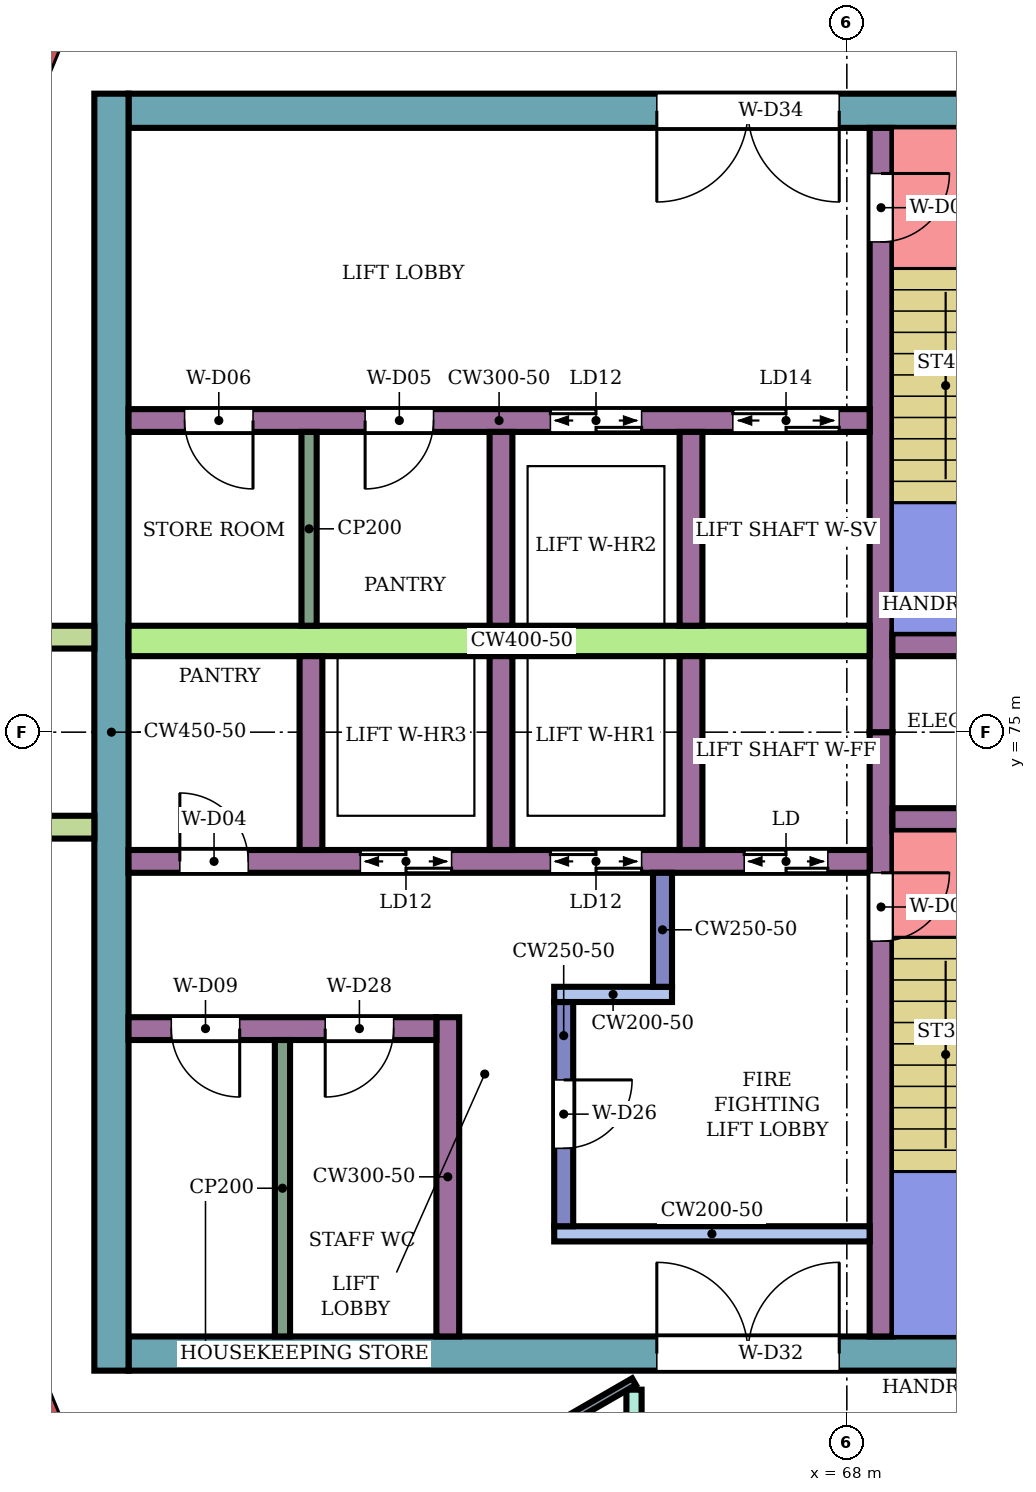
"""IFC4 building model, lengths in metres.
Left out: names, types, materials, properties, quantities, classifications, styles, units other than length and angle.
Written with IfcOpenShell. Run it as: python <this file> out.ifc"""

import sys

from ifc_helpers import new_model, si_unit, direction, frame, frame_2d, origin, place, context, subcontext, project, spatial, rectangle, extrude, element, fill, save


model = new_model("IFC4")
c1 = context("Model", 3, precision=1e-05, world=origin(), true_north=direction((0.0, 1.0)))
c2 = subcontext(c1, "Body", "Model", "MODEL_VIEW")
j1 = project(units=[si_unit("LENGTHUNIT", "METRE"), si_unit("PLANEANGLEUNIT", "RADIAN")], contexts=[c1])
p1 = place(None, origin())
s1 = spatial("IfcSite", under=j1, at=p1, CompositionType="ELEMENT")
p2 = place(p1, origin())
s2 = spatial("IfcBuilding", under=s1, at=p2, CompositionType="ELEMENT")
p3 = place(p2, frame((0.0, 0.0, 284.1)))
s3 = spatial("IfcBuildingStorey", under=s2, at=p3, CompositionType="ELEMENT", Elevation=284.1)
p4 = place(p3, frame((72.1, 66.825, 0.0), z_axis=(0.0, 0.0, 1.0), x_axis=(-1.0, 0.0, 0.0)))
e1 = element("IfcWall", 1, at=p4, inside=s3, PredefinedType="SHEAR", context=c2, shape_type="SweptSolid", body=[
    extrude(rectangle(XDim=13.55, YDim=0.45, at=frame_2d((6.775, 0.0))), origin(), (0.0, 0.0, 1.0), 3.88),
])
p5 = place(p4, frame((4.2, 0.0, 0.0)))
e2 = element("IfcOpeningElement", 2, at=p5, cuts=e1, PredefinedType="OPENING", context=c2, shape_type="SweptSolid", body=[
    extrude(rectangle(XDim=2.4, YDim=2.4, at=frame_2d((1.2, 1.2))), frame((0.0, 0.235, 0.0), z_axis=(0.0, -1.0, 0.0), x_axis=(1.0, 0.0, 0.0)), (0.0, 0.0, 1.0), 0.47),
])
p6 = place(p3, frame((72.1, 83.175, 0.0), z_axis=(0.0, 0.0, 1.0), x_axis=(-1.0, 0.0, 0.0)))
e3 = element("IfcWall", 3, at=p6, inside=s3, PredefinedType="SHEAR", context=c2, shape_type="SweptSolid", body=[
    extrude(rectangle(XDim=13.55, YDim=0.45, at=frame_2d((6.775, 0.0))), origin(), (0.0, 0.0, 1.0), 3.88),
])
p7 = place(p6, frame((4.2, 0.0, 0.0)))
e4 = element("IfcOpeningElement", 4, at=p7, cuts=e3, PredefinedType="OPENING", context=c2, shape_type="SweptSolid", body=[
    extrude(rectangle(XDim=2.4, YDim=2.4, at=frame_2d((1.2, 1.2))), frame((0.0, 0.235, 0.0), z_axis=(0.0, -1.0, 0.0), x_axis=(1.0, 0.0, 0.0)), (0.0, 0.0, 1.0), 0.47),
])
p8 = place(p3, frame((58.325, 83.4, 0.0), z_axis=(0.0, 0.0, 1.0), x_axis=(0.0, -1.0, 0.0)))
e5 = element("IfcWall", 5, at=p8, inside=s3, PredefinedType="SHEAR", context=c2, shape_type="SweptSolid", body=[
    extrude(rectangle(XDim=16.8, YDim=0.45, at=frame_2d((8.4, 0.0))), origin(), (0.0, 0.0, 1.0), 3.88),
])
p9 = place(p3, frame((68.45, 75.0, 0.0), z_axis=(0.0, 0.0, 1.0), x_axis=(0.0, -1.0, 0.0)))
e6 = element("IfcWall", 6, at=p9, inside=s3, PredefinedType="SHEAR", context=c2, shape_type="SweptSolid", body=[
    extrude(rectangle(XDim=7.95, YDim=0.3, at=frame_2d((3.975, 0.0))), origin(), (0.0, 0.0, 1.0), 3.88),
])
p10 = place(p9, frame((1.85, 0.0, 0.0)))
e7 = element("IfcOpeningElement", 7, at=p10, cuts=e6, PredefinedType="OPENING", context=c2, shape_type="SweptSolid", body=[
    extrude(rectangle(XDim=0.9, YDim=2.1, at=frame_2d((0.45, 1.05))), frame((0.0, 0.16, 0.0), z_axis=(0.0, -1.0, 0.0), x_axis=(1.0, 0.0, 0.0)), (0.0, 0.0, 1.0), 0.32),
])
p11 = place(p3, frame((68.45, 82.95, 0.0), z_axis=(0.0, 0.0, 1.0), x_axis=(0.0, -1.0, 0.0)))
e8 = element("IfcWall", 8, at=p11, inside=s3, PredefinedType="SHEAR", context=c2, shape_type="SweptSolid", body=[
    extrude(rectangle(XDim=7.95, YDim=0.3, at=frame_2d((3.975, 0.0))), origin(), (0.0, 0.0, 1.0), 3.88),
])
p12 = place(p11, frame((0.6, 0.0, 0.0)))
e9 = element("IfcOpeningElement", 9, at=p12, cuts=e8, PredefinedType="OPENING", context=c2, shape_type="SweptSolid", body=[
    extrude(rectangle(XDim=0.9, YDim=2.1, at=frame_2d((0.45, 1.05))), frame((0.0, 0.16, 0.0), z_axis=(0.0, -1.0, 0.0), x_axis=(1.0, 0.0, 0.0)), (0.0, 0.0, 1.0), 0.32),
])
p13 = place(p3, frame((71.65, 73.85, 0.0), z_axis=(0.0, 0.0, 1.0), x_axis=(-1.0, 0.0, 0.0)))
e10 = element("IfcWall", 10, at=p13, inside=s3, PredefinedType="SHEAR", context=c2, shape_type="SweptSolid", body=[
    extrude(rectangle(XDim=3.05, YDim=0.3, at=frame_2d((1.525, 0.0))), origin(), (0.0, 0.0, 1.0), 3.88),
])
p14 = place(p13, frame((1.1, 0.0, 0.0)))
e11 = element("IfcOpeningElement", 11, at=p14, cuts=e10, PredefinedType="OPENING", context=c2, shape_type="SweptSolid", body=[
    extrude(rectangle(XDim=0.7, YDim=2.0, at=frame_2d((0.35, 1.0))), frame((0.0, 0.16, 0.0), z_axis=(0.0, -1.0, 0.0), x_axis=(1.0, 0.0, 0.0)), (0.0, 0.0, 1.0), 0.32),
])
p15 = place(p3, frame((71.65, 76.15, 0.0), z_axis=(0.0, 0.0, 1.0), x_axis=(-1.0, 0.0, 0.0)))
e12 = element("IfcWall", 12, at=p15, inside=s3, PredefinedType="SHEAR", context=c2, shape_type="SweptSolid", body=[
    extrude(rectangle(XDim=3.05, YDim=0.3, at=frame_2d((1.525, 0.0))), origin(), (0.0, 0.0, 1.0), 3.88),
])
p16 = place(p3, frame((68.3, 73.3, 0.0), z_axis=(0.0, 0.0, 1.0), x_axis=(-1.0, 0.0, 0.0)))
e13 = element("IfcWall", 13, at=p16, inside=s3, PredefinedType="SHEAR", context=c2, shape_type="SweptSolid", body=[
    extrude(rectangle(XDim=9.75, YDim=0.3, at=frame_2d((4.875, 0.0))), origin(), (0.0, 0.0, 1.0), 3.88),
])
p17 = place(p16, frame((0.55, 0.0, 0.0)))
e14 = element("IfcOpeningElement", 14, at=p17, cuts=e13, PredefinedType="OPENING", context=c2, shape_type="SweptSolid", body=[
    extrude(rectangle(XDim=1.1, YDim=2.1, at=frame_2d((0.55, 1.05))), frame((0.0, 0.16, 0.0), z_axis=(0.0, -1.0, 0.0), x_axis=(1.0, 0.0, 0.0)), (0.0, 0.0, 1.0), 0.32),
])
p18 = place(p16, frame((3.0, 0.0, 0.0)))
e15 = element("IfcOpeningElement", 15, at=p18, cuts=e13, PredefinedType="OPENING", context=c2, shape_type="SweptSolid", body=[
    extrude(rectangle(XDim=1.2, YDim=2.1, at=frame_2d((0.6, 1.05))), frame((0.0, 0.16, 0.0), z_axis=(0.0, -1.0, 0.0), x_axis=(1.0, 0.0, 0.0)), (0.0, 0.0, 1.0), 0.32),
])
p19 = place(p16, frame((5.5, 0.0, 0.0)))
e16 = element("IfcOpeningElement", 16, at=p19, cuts=e13, PredefinedType="OPENING", context=c2, shape_type="SweptSolid", body=[
    extrude(rectangle(XDim=1.2, YDim=2.1, at=frame_2d((0.6, 1.05))), frame((0.0, 0.16, 0.0), z_axis=(0.0, -1.0, 0.0), x_axis=(1.0, 0.0, 0.0)), (0.0, 0.0, 1.0), 0.32),
])
p20 = place(p16, frame((8.175, 0.0, 0.0)))
e17 = element("IfcOpeningElement", 17, at=p20, cuts=e13, PredefinedType="OPENING", context=c2, shape_type="SweptSolid", body=[
    extrude(rectangle(XDim=0.9, YDim=2.1, at=frame_2d((0.45, 1.05))), frame((0.0, 0.16, 0.0), z_axis=(0.0, -1.0, 0.0), x_axis=(1.0, 0.0, 0.0)), (0.0, 0.0, 1.0), 0.32),
])
p21 = place(p3, frame((68.3, 76.2, 0.0), z_axis=(0.0, 0.0, 1.0), x_axis=(-1.0, 0.0, 0.0)))
e18 = element("IfcWall", 18, at=p21, inside=s3, PredefinedType="SHEAR", context=c2, shape_type="SweptSolid", body=[
    extrude(rectangle(XDim=9.75, YDim=0.4, at=frame_2d((4.875, 0.0))), origin(), (0.0, 0.0, 1.0), 3.88),
])
p22 = place(p3, frame((68.3, 79.1, 0.0), z_axis=(0.0, 0.0, 1.0), x_axis=(-1.0, 0.0, 0.0)))
e19 = element("IfcWall", 19, at=p22, inside=s3, PredefinedType="SHEAR", context=c2, shape_type="SweptSolid", body=[
    extrude(rectangle(XDim=9.75, YDim=0.3, at=frame_2d((4.875, 0.0))), origin(), (0.0, 0.0, 1.0), 3.88),
])
p23 = place(p22, frame((0.4, 0.0, 0.0)))
e20 = element("IfcOpeningElement", 20, at=p23, cuts=e19, PredefinedType="OPENING", context=c2, shape_type="SweptSolid", body=[
    extrude(rectangle(XDim=1.4, YDim=2.1, at=frame_2d((0.7, 1.05))), frame((0.0, 0.16, 0.0), z_axis=(0.0, -1.0, 0.0), x_axis=(1.0, 0.0, 0.0)), (0.0, 0.0, 1.0), 0.32),
])
p24 = place(p22, frame((3.0, 0.0, 0.0)))
e21 = element("IfcOpeningElement", 21, at=p24, cuts=e19, PredefinedType="OPENING", context=c2, shape_type="SweptSolid", body=[
    extrude(rectangle(XDim=1.2, YDim=2.1, at=frame_2d((0.6, 1.05))), frame((0.0, 0.16, 0.0), z_axis=(0.0, -1.0, 0.0), x_axis=(1.0, 0.0, 0.0)), (0.0, 0.0, 1.0), 0.32),
])
p25 = place(p22, frame((5.738, 0.0, 0.0)))
e22 = element("IfcOpeningElement", 22, at=p25, cuts=e19, PredefinedType="OPENING", context=c2, shape_type="SweptSolid", body=[
    extrude(rectangle(XDim=0.9, YDim=2.1, at=frame_2d((0.45, 1.05))), frame((0.0, 0.16, 0.0), z_axis=(0.0, -1.0, 0.0), x_axis=(1.0, 0.0, 0.0)), (0.0, 0.0, 1.0), 0.32),
])
p26 = place(p22, frame((8.113, 0.0, 0.0)))
e23 = element("IfcOpeningElement", 23, at=p26, cuts=e19, PredefinedType="OPENING", context=c2, shape_type="SweptSolid", body=[
    extrude(rectangle(XDim=0.9, YDim=2.1, at=frame_2d((0.45, 1.05))), frame((0.0, 0.16, 0.0), z_axis=(0.0, -1.0, 0.0), x_axis=(1.0, 0.0, 0.0)), (0.0, 0.0, 1.0), 0.32),
])
for number, where, z_axis, x_axis in (
    (24, (65.95, 76.0, 0.0), (0.0, 0.0, 1.0), (0.0, -1.0, 0.0)),
    (25, (63.45, 76.0, 0.0), (0.0, 0.0, 1.0), (0.0, -1.0, 0.0)),
    (26, (60.95, 76.0, 0.0), (0.0, 0.0, 1.0), (0.0, -1.0, 0.0)),
    (27, (65.95, 78.95, 0.0), (0.0, 0.0, 1.0), (0.0, -1.0, 0.0)),
    (28, (63.45, 78.95, 0.0), (0.0, 0.0, 1.0), (0.0, -1.0, 0.0)),
):
    element("IfcWall", number, at=place(p3, frame(where, z_axis=z_axis, x_axis=x_axis)), inside=s3, PredefinedType="SHEAR", context=c2, shape_type="SweptSolid", body=[
        extrude(rectangle(XDim=2.55, YDim=0.3, at=frame_2d((1.275, 0.0))), origin(), (0.0, 0.0, 1.0), 3.88),
    ])
p27 = place(p3, frame((68.3, 68.4, 0.0), z_axis=(0.0, 0.0, 1.0), x_axis=(-1.0, 0.0, 0.0)))
e29 = element("IfcWall", 29, at=p27, inside=s3, PredefinedType="SHEAR", context=c2, shape_type="SweptSolid", body=[
    extrude(rectangle(XDim=4.15, YDim=0.2, at=frame_2d((2.075, 0.0))), origin(), (0.0, 0.0, 1.0), 3.88),
])
p28 = place(p3, frame((64.275, 71.45, 0.0), z_axis=(0.0, 0.0, 1.0), x_axis=(0.0, -1.0, 0.0)))
e30 = element("IfcWall", 30, at=p28, inside=s3, PredefinedType="SHEAR", context=c2, shape_type="SweptSolid", body=[
    extrude(rectangle(XDim=2.95, YDim=0.25, at=frame_2d((1.475, 0.0))), origin(), (0.0, 0.0, 1.0), 3.88),
])
p29 = place(p28, frame((1.025, 0.0, 0.0)))
e31 = element("IfcOpeningElement", 31, at=p29, cuts=e30, PredefinedType="OPENING", context=c2, shape_type="SweptSolid", body=[
    extrude(rectangle(XDim=0.9, YDim=2.1, at=frame_2d((0.45, 1.05))), frame((0.0, 0.135, 0.0), z_axis=(0.0, -1.0, 0.0), x_axis=(1.0, 0.0, 0.0)), (0.0, 0.0, 1.0), 0.27),
])
p30 = place(p3, frame((65.7, 71.55, 0.0), z_axis=(0.0, 0.0, 1.0), x_axis=(-1.0, 0.0, 0.0)))
e32 = element("IfcWall", 32, at=p30, inside=s3, PredefinedType="SHEAR", context=c2, shape_type="SweptSolid", body=[
    extrude(rectangle(XDim=1.55, YDim=0.2, at=frame_2d((0.775, 0.0))), origin(), (0.0, 0.0, 1.0), 3.88),
])
p31 = place(p3, frame((65.575, 73.15, 0.0), z_axis=(0.0, 0.0, 1.0), x_axis=(0.0, -1.0, 0.0)))
e33 = element("IfcWall", 33, at=p31, inside=s3, PredefinedType="SHEAR", context=c2, shape_type="SweptSolid", body=[
    extrude(rectangle(XDim=1.5, YDim=0.25, at=frame_2d((0.75, 0.0))), origin(), (0.0, 0.0, 1.0), 3.88),
])
p32 = place(p3, frame((62.75, 71.25, 0.0), z_axis=(0.0, 0.0, 1.0), x_axis=(0.0, -1.0, 0.0)))
e34 = element("IfcWall", 34, at=p32, inside=s3, PredefinedType="SHEAR", context=c2, shape_type="SweptSolid", body=[
    extrude(rectangle(XDim=4.2, YDim=0.3, at=frame_2d((2.1, 0.0))), origin(), (0.0, 0.0, 1.0), 3.88),
])
p33 = place(p3, frame((62.6, 71.1, 0.0), z_axis=(0.0, 0.0, 1.0), x_axis=(-1.0, 0.0, 0.0)))
e35 = element("IfcWall", 35, at=p33, inside=s3, PredefinedType="SHEAR", context=c2, shape_type="SweptSolid", body=[
    extrude(rectangle(XDim=4.05, YDim=0.3, at=frame_2d((2.025, 0.0))), origin(), (0.0, 0.0, 1.0), 3.88),
])
p34 = place(p33, frame((0.562, 0.0, 0.0)))
e36 = element("IfcOpeningElement", 36, at=p34, cuts=e35, PredefinedType="OPENING", context=c2, shape_type="SweptSolid", body=[
    extrude(rectangle(XDim=0.9, YDim=2.1, at=frame_2d((0.45, 1.05))), frame((0.0, 0.16, 0.0), z_axis=(0.0, -1.0, 0.0), x_axis=(1.0, 0.0, 0.0)), (0.0, 0.0, 1.0), 0.32),
])
p35 = place(p33, frame((2.587, 0.0, 0.0)))
e37 = element("IfcOpeningElement", 37, at=p35, cuts=e35, PredefinedType="OPENING", context=c2, shape_type="SweptSolid", body=[
    extrude(rectangle(XDim=0.9, YDim=2.1, at=frame_2d((0.45, 1.05))), frame((0.0, 0.16, 0.0), z_axis=(0.0, -1.0, 0.0), x_axis=(1.0, 0.0, 0.0)), (0.0, 0.0, 1.0), 0.32),
])
for number, where, z_axis, x_axis in (
    (38, (58.1, 76.25, 0.0), (0.0, 0.0, 1.0), (-1.0, 0.0, 0.0)),
    (39, (58.1, 73.75, 0.0), (0.0, 0.0, 1.0), (-1.0, 0.0, 0.0)),
):
    element("IfcWall", number, at=place(p3, frame(where, z_axis=z_axis, x_axis=x_axis)), inside=s3, PredefinedType="NOTDEFINED", context=c2, shape_type="SweptSolid", body=[
        extrude(rectangle(XDim=2.416, YDim=0.3, at=frame_2d((1.208, 0.0))), origin(), (0.0, 0.0, 1.0), 4.2),
    ])
p36 = place(p3, frame((65.2, 65.2, 0.0), z_axis=(0.0, 0.0, 1.0), x_axis=(0.0, 1.0, 0.0)))
e40 = element("IfcWall", 40, at=p36, inside=s3, PredefinedType="PARTITIONING", context=c2, shape_type="SweptSolid", body=[
    extrude(rectangle(XDim=1.15, YDim=0.2, at=frame_2d((0.575, 0.0))), origin(), (0.0, 0.0, 1.0), 3.75),
])
p37 = place(p3, frame((58.958, 62.851, 0.0), z_axis=(0.0, 0.0, 1.0), x_axis=(0.866044015472, 0.499967762227, 0.0)))
e41 = element("IfcWall", 41, at=p37, inside=s3, PredefinedType="PARTITIONING", context=c2, shape_type="SweptSolid", body=[
    extrude(rectangle(XDim=7.208, YDim=0.1, at=frame_2d((3.604, 0.0))), origin(), (0.0, 0.0, 1.0), 3.75),
])
p38 = place(p37, frame((3.179, 0.0, 0.0)))
e42 = element("IfcOpeningElement", 42, at=p38, cuts=e41, PredefinedType="OPENING", context=c2, shape_type="SweptSolid", body=[
    extrude(rectangle(XDim=0.9, YDim=2.1, at=frame_2d((0.45, 1.05))), frame((0.0, 0.06, 0.0), z_axis=(0.0, -1.0, 0.0), x_axis=(1.0, 0.0, 0.0)), (0.0, 0.0, 1.0), 0.12),
])
p39 = place(p3, frame((60.925, 78.95, 0.0), z_axis=(0.0, 0.0, 1.0), x_axis=(0.0, -1.0, 0.0)))
e43 = element("IfcWall", 43, at=p39, inside=s3, PredefinedType="PARTITIONING", context=c2, shape_type="SweptSolid", body=[
    extrude(rectangle(XDim=2.55, YDim=0.2, at=frame_2d((1.275, 0.0))), origin(), (0.0, 0.0, 1.0), 3.88),
])
p40 = place(p3, frame((60.575, 70.95, 0.0), z_axis=(0.0, 0.0, 1.0), x_axis=(0.0, -1.0, 0.0)))
e44 = element("IfcWall", 44, at=p40, inside=s3, PredefinedType="PARTITIONING", context=c2, shape_type="SweptSolid", body=[
    extrude(rectangle(XDim=3.9, YDim=0.2, at=frame_2d((1.95, 0.0))), origin(), (0.0, 0.0, 1.0), 3.88),
])
p41 = place(p10, origin())
e45 = element("IfcDoor", 45, at=p41, inside=s3, OperationType="SINGLE_SWING_LEFT", PredefinedType="DOOR", context=c2, shape_type="SweptSolid", body=[
    extrude(rectangle(XDim=0.9, YDim=2.1, at=frame_2d((0.45, 1.05))), frame((0.0, 0.025, 0.0), z_axis=(0.0, -1.0, 0.0), x_axis=(1.0, 0.0, 0.0)), (0.0, 0.0, 1.0), 0.05),
])
fill(e7, e45)
p42 = place(p12, origin())
e46 = element("IfcDoor", 46, at=p42, inside=s3, OperationType="SINGLE_SWING_LEFT", PredefinedType="DOOR", context=c2, shape_type="SweptSolid", body=[
    extrude(rectangle(XDim=0.9, YDim=2.1, at=frame_2d((0.45, 1.05))), frame((0.0, 0.025, 0.0), z_axis=(0.0, -1.0, 0.0), x_axis=(1.0, 0.0, 0.0)), (0.0, 0.0, 1.0), 0.05),
])
fill(e9, e46)
p43 = place(p17, origin())
e47 = element("IfcDoor", 47, at=p43, inside=s3, OperationType="DOUBLE_DOOR_SLIDING", PredefinedType="DOOR", context=c2, shape_type="SweptSolid", body=[
    extrude(rectangle(XDim=1.1, YDim=2.1, at=frame_2d((0.55, 1.05))), frame((0.0, 0.025, 0.0), z_axis=(0.0, -1.0, 0.0), x_axis=(1.0, 0.0, 0.0)), (0.0, 0.0, 1.0), 0.05),
])
fill(e14, e47)
p44 = place(p18, origin())
e48 = element("IfcDoor", 48, at=p44, inside=s3, OperationType="DOUBLE_DOOR_SLIDING", PredefinedType="DOOR", context=c2, shape_type="SweptSolid", body=[
    extrude(rectangle(XDim=1.2, YDim=2.1, at=frame_2d((0.6, 1.05))), frame((0.0, 0.025, 0.0), z_axis=(0.0, -1.0, 0.0), x_axis=(1.0, 0.0, 0.0)), (0.0, 0.0, 1.0), 0.05),
])
fill(e15, e48)
p45 = place(p19, origin())
e49 = element("IfcDoor", 49, at=p45, inside=s3, OperationType="DOUBLE_DOOR_SLIDING", PredefinedType="DOOR", context=c2, shape_type="SweptSolid", body=[
    extrude(rectangle(XDim=1.2, YDim=2.1, at=frame_2d((0.6, 1.05))), frame((0.0, 0.025, 0.0), z_axis=(0.0, -1.0, 0.0), x_axis=(1.0, 0.0, 0.0)), (0.0, 0.0, 1.0), 0.05),
])
fill(e16, e49)
p46 = place(p20, frame((0.9, 0.0, 0.0), z_axis=(0.0, 0.0, 1.0), x_axis=(-1.0, 0.0, 0.0)))
e50 = element("IfcDoor", 50, at=p46, inside=s3, OperationType="SINGLE_SWING_LEFT", PredefinedType="DOOR", context=c2, shape_type="SweptSolid", body=[
    extrude(rectangle(XDim=0.9, YDim=2.1, at=frame_2d((0.45, 1.05))), frame((0.0, 0.025, 0.0), z_axis=(0.0, -1.0, 0.0), x_axis=(1.0, 0.0, 0.0)), (0.0, 0.0, 1.0), 0.05),
])
fill(e17, e50)
p47 = place(p23, origin())
e51 = element("IfcDoor", 51, at=p47, inside=s3, OperationType="DOUBLE_DOOR_SLIDING", PredefinedType="DOOR", context=c2, shape_type="SweptSolid", body=[
    extrude(rectangle(XDim=1.4, YDim=2.1, at=frame_2d((0.7, 1.05))), frame((0.0, 0.025, 0.0), z_axis=(0.0, -1.0, 0.0), x_axis=(1.0, 0.0, 0.0)), (0.0, 0.0, 1.0), 0.05),
])
fill(e20, e51)
p48 = place(p24, origin())
e52 = element("IfcDoor", 52, at=p48, inside=s3, OperationType="DOUBLE_DOOR_SLIDING", PredefinedType="DOOR", context=c2, shape_type="SweptSolid", body=[
    extrude(rectangle(XDim=1.2, YDim=2.1, at=frame_2d((0.6, 1.05))), frame((0.0, 0.025, 0.0), z_axis=(0.0, -1.0, 0.0), x_axis=(1.0, 0.0, 0.0)), (0.0, 0.0, 1.0), 0.05),
])
fill(e21, e52)
p49 = place(p25, origin())
e53 = element("IfcDoor", 53, at=p49, inside=s3, OperationType="SINGLE_SWING_RIGHT", PredefinedType="DOOR", context=c2, shape_type="SweptSolid", body=[
    extrude(rectangle(XDim=0.9, YDim=2.1, at=frame_2d((0.45, 1.05))), frame((0.0, 0.025, 0.0), z_axis=(0.0, -1.0, 0.0), x_axis=(1.0, 0.0, 0.0)), (0.0, 0.0, 1.0), 0.05),
])
fill(e22, e53)
p50 = place(p26, origin())
e54 = element("IfcDoor", 54, at=p50, inside=s3, OperationType="SINGLE_SWING_LEFT", PredefinedType="DOOR", context=c2, shape_type="SweptSolid", body=[
    extrude(rectangle(XDim=0.9, YDim=2.1, at=frame_2d((0.45, 1.05))), frame((0.0, 0.025, 0.0), z_axis=(0.0, -1.0, 0.0), x_axis=(1.0, 0.0, 0.0)), (0.0, 0.0, 1.0), 0.05),
])
fill(e23, e54)
p51 = place(p29, origin())
e55 = element("IfcDoor", 55, at=p51, inside=s3, OperationType="SINGLE_SWING_LEFT", PredefinedType="DOOR", context=c2, shape_type="SweptSolid", body=[
    extrude(rectangle(XDim=0.9, YDim=2.1, at=frame_2d((0.45, 1.05))), frame((0.0, 0.025, 0.0), z_axis=(0.0, -1.0, 0.0), x_axis=(1.0, 0.0, 0.0)), (0.0, 0.0, 1.0), 0.05),
])
fill(e31, e55)
p52 = place(p34, origin())
e56 = element("IfcDoor", 56, at=p52, inside=s3, OperationType="SINGLE_SWING_RIGHT", PredefinedType="DOOR", context=c2, shape_type="SweptSolid", body=[
    extrude(rectangle(XDim=0.9, YDim=2.1, at=frame_2d((0.45, 1.05))), frame((0.0, 0.025, 0.0), z_axis=(0.0, -1.0, 0.0), x_axis=(1.0, 0.0, 0.0)), (0.0, 0.0, 1.0), 0.05),
])
fill(e36, e56)
p53 = place(p35, origin())
e57 = element("IfcDoor", 57, at=p53, inside=s3, OperationType="SINGLE_SWING_LEFT", PredefinedType="DOOR", context=c2, shape_type="SweptSolid", body=[
    extrude(rectangle(XDim=0.9, YDim=2.1, at=frame_2d((0.45, 1.05))), frame((0.0, 0.025, 0.0), z_axis=(0.0, -1.0, 0.0), x_axis=(1.0, 0.0, 0.0)), (0.0, 0.0, 1.0), 0.05),
])
fill(e37, e57)
p54 = place(p5, frame((2.4, 0.0, 0.0), z_axis=(0.0, 0.0, 1.0), x_axis=(-1.0, 0.0, 0.0)))
e58 = element("IfcDoor", 58, at=p54, inside=s3, OperationType="DOUBLE_DOOR_SINGLE_SWING", PredefinedType="DOOR", context=c2, shape_type="SweptSolid", body=[
    extrude(rectangle(XDim=2.4, YDim=2.4, at=frame_2d((1.2, 1.2))), frame((0.0, 0.025, 0.0), z_axis=(0.0, -1.0, 0.0), x_axis=(1.0, 0.0, 0.0)), (0.0, 0.0, 1.0), 0.05),
])
fill(e2, e58)
p55 = place(p7, origin())
e59 = element("IfcDoor", 59, at=p55, inside=s3, OperationType="DOUBLE_DOOR_SINGLE_SWING", PredefinedType="DOOR", context=c2, shape_type="SweptSolid", body=[
    extrude(rectangle(XDim=2.4, YDim=2.4, at=frame_2d((1.2, 1.2))), frame((0.0, 0.025, 0.0), z_axis=(0.0, -1.0, 0.0), x_axis=(1.0, 0.0, 0.0)), (0.0, 0.0, 1.0), 0.05),
])
fill(e4, e59)
save(model, sys.argv[1])
